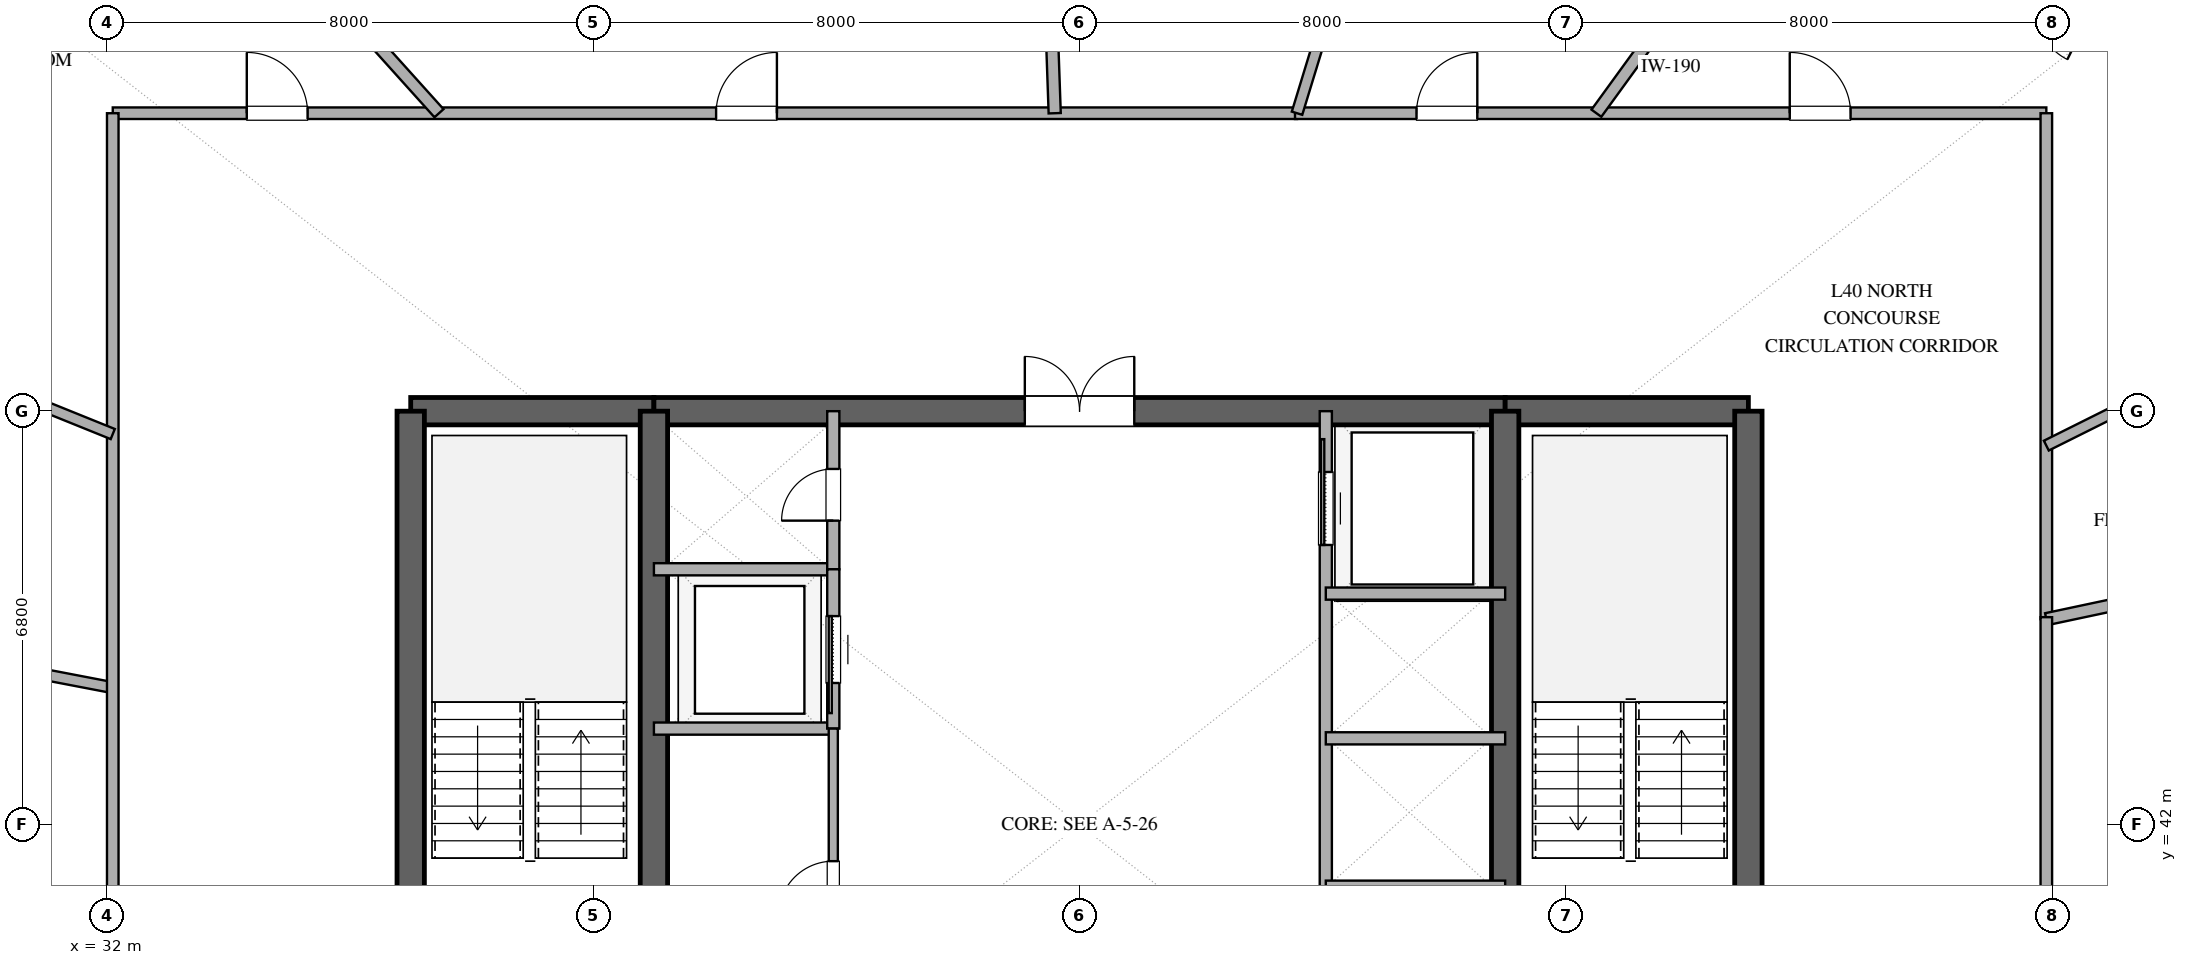
"""IFC4 building model, lengths in metres.
Left out: names, types, materials, properties, quantities, classifications, styles, units other than length and angle.
Written with IfcOpenShell. Run it as: python <this file> out.ifc"""

import sys

from ifc_helpers import new_model, si_unit, direction, frame, frame_2d, origin, place, context, subcontext, project, spatial, rectangle, extrude, element, fill, save


model = new_model("IFC4")
c1 = context("Model", 3, precision=1e-05, world=origin(), true_north=direction((0.0, 1.0)))
c2 = subcontext(c1, "Body", "Model", "MODEL_VIEW")
j1 = project(units=[si_unit("LENGTHUNIT", "METRE"), si_unit("PLANEANGLEUNIT", "RADIAN")], contexts=[c1])
p1 = place(None, origin())
s1 = spatial("IfcSite", under=j1, at=p1, CompositionType="ELEMENT")
p2 = place(p1, origin())
s2 = spatial("IfcBuilding", under=s1, at=p2, CompositionType="ELEMENT")
p3 = place(p2, frame((0.0, 0.0, 161.4)))
s3 = spatial("IfcBuildingStorey", under=s2, at=p3, CompositionType="ELEMENT", Elevation=161.4)
p4 = place(p3, frame((37.0, 48.8, 0.0), z_axis=(0.0, 0.0, 1.0), x_axis=(1.0, 0.0, 0.0)))
e1 = element("IfcWall", 1, at=p4, inside=s3, PredefinedType="SHEAR", context=c2, shape_type="SweptSolid", body=[
    extrude(rectangle(XDim=4.0, YDim=0.45, at=frame_2d((2.0, 0.0))), origin(), (0.0, 0.0, 1.0), 3.38),
])
p5 = place(p3, frame((41.0, 48.8, 0.0), z_axis=(0.0, 0.0, 1.0), x_axis=(1.0, 0.0, 0.0)))
e2 = element("IfcWall", 2, at=p5, inside=s3, PredefinedType="SHEAR", context=c2, shape_type="SweptSolid", body=[
    extrude(rectangle(XDim=14.0, YDim=0.45, at=frame_2d((7.0, 0.0))), origin(), (0.0, 0.0, 1.0), 3.38),
])
p6 = place(p5, frame((6.1, 0.0, 0.0)))
e3 = element("IfcOpeningElement", 3, at=p6, cuts=e2, PredefinedType="OPENING", context=c2, shape_type="SweptSolid", body=[
    extrude(rectangle(XDim=1.8, YDim=2.25, at=frame_2d((0.9, 1.125))), frame((0.0, 0.235, 0.0), z_axis=(0.0, -1.0, 0.0), x_axis=(1.0, 0.0, 0.0)), (0.0, 0.0, 1.0), 0.47),
])
p7 = place(p3, frame((55.0, 48.8, 0.0), z_axis=(0.0, 0.0, 1.0), x_axis=(1.0, 0.0, 0.0)))
e4 = element("IfcWall", 4, at=p7, inside=s3, PredefinedType="SHEAR", context=c2, shape_type="SweptSolid", body=[
    extrude(rectangle(XDim=4.0, YDim=0.45, at=frame_2d((2.0, 0.0))), origin(), (0.0, 0.0, 1.0), 3.38),
])
for number, where, z_axis, x_axis in (
    (5, (37.0, 35.2, 0.0), (0.0, 0.0, 1.0), (0.0, 1.0, 0.0)),
    (6, (59.0, 35.2, 0.0), (0.0, 0.0, 1.0), (0.0, 1.0, 0.0)),
):
    element("IfcWall", number, at=place(p3, frame(where, z_axis=z_axis, x_axis=x_axis)), inside=s3, PredefinedType="SHEAR", context=c2, shape_type="SweptSolid", body=[
        extrude(rectangle(XDim=13.6, YDim=0.45, at=frame_2d((6.8, 0.0))), origin(), (0.0, 0.0, 1.0), 3.38),
    ])
p8 = place(p3, frame((41.0, 35.2, 0.0), z_axis=(0.0, 0.0, 1.0), x_axis=(0.0, 1.0, 0.0)))
e7 = element("IfcWall", 7, at=p8, inside=s3, PredefinedType="SHEAR", context=c2, shape_type="SweptSolid", body=[
    extrude(rectangle(XDim=13.6, YDim=0.45, at=frame_2d((6.8, 0.0))), origin(), (0.0, 0.0, 1.0), 3.38),
])
p9 = place(p8, frame((1.15, 0.0, 0.0)))
e8 = element("IfcOpeningElement", 8, at=p9, cuts=e7, PredefinedType="OPENING", context=c2, shape_type="SweptSolid", body=[
    extrude(rectangle(XDim=1.1, YDim=2.2, at=frame_2d((0.55, 1.1))), frame((0.0, 0.235, 0.0), z_axis=(0.0, -1.0, 0.0), x_axis=(1.0, 0.0, 0.0)), (0.0, 0.0, 1.0), 0.47),
])
p10 = place(p3, frame((55.0, 35.2, 0.0), z_axis=(0.0, 0.0, 1.0), x_axis=(0.0, 1.0, 0.0)))
e9 = element("IfcWall", 9, at=p10, inside=s3, PredefinedType="SHEAR", context=c2, shape_type="SweptSolid", body=[
    extrude(rectangle(XDim=13.6, YDim=0.45, at=frame_2d((6.8, 0.0))), origin(), (0.0, 0.0, 1.0), 3.38),
])
p11 = place(p10, frame((1.15, 0.0, 0.0)))
e10 = element("IfcOpeningElement", 10, at=p11, cuts=e9, PredefinedType="OPENING", context=c2, shape_type="SweptSolid", body=[
    extrude(rectangle(XDim=1.1, YDim=2.2, at=frame_2d((0.55, 1.1))), frame((0.0, 0.235, 0.0), z_axis=(0.0, -1.0, 0.0), x_axis=(1.0, 0.0, 0.0)), (0.0, 0.0, 1.0), 0.47),
])
p12 = place(p3, frame((41.0, 46.2, 0.0), z_axis=(0.0, 0.0, 1.0), x_axis=(1.0, 0.0, 0.0)))
e11 = element("IfcWall", 11, at=p12, inside=s3, PredefinedType="SOLIDWALL", context=c2, shape_type="SweptSolid", body=[
    extrude(rectangle(XDim=2.95, YDim=0.2, at=frame_2d((1.475, 0.0))), origin(), (0.0, 0.0, 1.0), 2.74),
])
p13 = place(p3, frame((43.95, 46.2, 0.0), z_axis=(0.0, 0.0, 1.0), x_axis=(0.0, 1.0, 0.0)))
e12 = element("IfcWall", 12, at=p13, inside=s3, PredefinedType="SOLIDWALL", context=c2, shape_type="SweptSolid", body=[
    extrude(rectangle(XDim=2.6, YDim=0.2, at=frame_2d((1.3, 0.0))), origin(), (0.0, 0.0, 1.0), 2.74),
])
p14 = place(p13, frame((0.8, 0.0, 0.0)))
e13 = element("IfcOpeningElement", 13, at=p14, cuts=e12, PredefinedType="OPENING", context=c2, shape_type="SweptSolid", body=[
    extrude(rectangle(XDim=0.85, YDim=2.15, at=frame_2d((0.425, 1.075))), frame((0.0, 0.11, 0.0), z_axis=(0.0, -1.0, 0.0), x_axis=(1.0, 0.0, 0.0)), (0.0, 0.0, 1.0), 0.22),
])
p15 = place(p3, frame((41.0, 43.58, 0.0), z_axis=(0.0, 0.0, 1.0), x_axis=(1.0, 0.0, 0.0)))
e14 = element("IfcWall", 14, at=p15, inside=s3, PredefinedType="SOLIDWALL", context=c2, shape_type="SweptSolid", body=[
    extrude(rectangle(XDim=2.95, YDim=0.2, at=frame_2d((1.475, 0.0))), origin(), (0.0, 0.0, 1.0), 2.74),
])
p16 = place(p3, frame((43.95, 43.58, 0.0), z_axis=(0.0, 0.0, 1.0), x_axis=(0.0, 1.0, 0.0)))
e15 = element("IfcWall", 15, at=p16, inside=s3, PredefinedType="SOLIDWALL", context=c2, shape_type="SweptSolid", body=[
    extrude(rectangle(XDim=2.62, YDim=0.2, at=frame_2d((1.31, 0.0))), origin(), (0.0, 0.0, 1.0), 2.74),
])
p17 = place(p16, frame((0.75, 0.0, 0.0)))
e16 = element("IfcOpeningElement", 16, at=p17, cuts=e15, PredefinedType="OPENING", context=c2, shape_type="SweptSolid", body=[
    extrude(rectangle(XDim=1.1, YDim=2.2, at=frame_2d((0.55, 1.1))), frame((0.0, 0.11, 0.0), z_axis=(0.0, -1.0, 0.0), x_axis=(1.0, 0.0, 0.0)), (0.0, 0.0, 1.0), 0.22),
])
p18 = place(p3, frame((43.95, 38.4, 0.0), z_axis=(0.0, 0.0, 1.0), x_axis=(0.0, 1.0, 0.0)))
e17 = element("IfcWall", 17, at=p18, inside=s3, PredefinedType="PARTITIONING", context=c2, shape_type="SweptSolid", body=[
    extrude(rectangle(XDim=5.18, YDim=0.15, at=frame_2d((2.59, 0.0))), origin(), (0.0, 0.0, 1.0), 2.74),
])
p19 = place(p18, frame((2.1, 0.0, 0.0)))
e18 = element("IfcOpeningElement", 18, at=p19, cuts=e17, PredefinedType="OPENING", context=c2, shape_type="SweptSolid", body=[
    extrude(rectangle(XDim=0.9, YDim=2.15, at=frame_2d((0.45, 1.075))), frame((0.0, 0.085, 0.0), z_axis=(0.0, -1.0, 0.0), x_axis=(1.0, 0.0, 0.0)), (0.0, 0.0, 1.0), 0.17),
])
p20 = place(p3, frame((52.05, 38.4, 0.0), z_axis=(0.0, 0.0, 1.0), x_axis=(0.0, 1.0, 0.0)))
e19 = element("IfcWall", 19, at=p20, inside=s3, PredefinedType="SOLIDWALL", context=c2, shape_type="SweptSolid", body=[
    extrude(rectangle(XDim=10.4, YDim=0.2, at=frame_2d((5.2, 0.0))), origin(), (0.0, 0.0, 1.0), 2.74),
])
p21 = place(p20, frame((0.7, 0.0, 0.0)))
e20 = element("IfcOpeningElement", 20, at=p21, cuts=e19, PredefinedType="OPENING", context=c2, shape_type="SweptSolid", body=[
    extrude(rectangle(XDim=1.1, YDim=2.2, at=frame_2d((0.55, 1.1))), frame((0.0, 0.11, 0.0), z_axis=(0.0, -1.0, 0.0), x_axis=(1.0, 0.0, 0.0)), (0.0, 0.0, 1.0), 0.22),
])
p22 = place(p20, frame((8.2, 0.0, 0.0)))
e21 = element("IfcOpeningElement", 21, at=p22, cuts=e19, PredefinedType="OPENING", context=c2, shape_type="SweptSolid", body=[
    extrude(rectangle(XDim=1.2, YDim=2.2, at=frame_2d((0.6, 1.1))), frame((0.0, 0.11, 0.0), z_axis=(0.0, -1.0, 0.0), x_axis=(1.0, 0.0, 0.0)), (0.0, 0.0, 1.0), 0.22),
])
for number, where, z_axis, x_axis in (
    (22, (52.05, 40.98, 0.0), (0.0, 0.0, 1.0), (1.0, 0.0, 0.0)),
    (23, (52.05, 43.42, 0.0), (0.0, 0.0, 1.0), (1.0, 0.0, 0.0)),
    (24, (52.05, 45.8, 0.0), (0.0, 0.0, 1.0), (1.0, 0.0, 0.0)),
):
    element("IfcWall", number, at=place(p3, frame(where, z_axis=z_axis, x_axis=x_axis)), inside=s3, PredefinedType="SOLIDWALL", context=c2, shape_type="SweptSolid", body=[
        extrude(rectangle(XDim=2.95, YDim=0.2, at=frame_2d((1.475, 0.0))), origin(), (0.0, 0.0, 1.0), 2.74),
    ])
p23 = place(p3, frame((32.1, 53.7, 0.0), z_axis=(0.0, 0.0, 1.0), x_axis=(1.0, 0.0, 0.0)))
e25 = element("IfcWall", 25, at=p23, inside=s3, PredefinedType="PARTITIONING", context=c2, shape_type="SweptSolid", body=[
    extrude(rectangle(XDim=19.477, YDim=0.19, at=frame_2d((9.738, 0.0))), origin(), (0.0, 0.0, 1.0), 2.74),
])
p24 = place(p23, frame((9.923, 0.0, 0.0)))
e26 = element("IfcOpeningElement", 26, at=p24, cuts=e25, PredefinedType="OPENING", context=c2, shape_type="SweptSolid", body=[
    extrude(rectangle(XDim=1.0, YDim=2.2, at=frame_2d((0.5, 1.1))), frame((0.0, 0.105, 0.0), z_axis=(0.0, -1.0, 0.0), x_axis=(1.0, 0.0, 0.0)), (0.0, 0.0, 1.0), 0.21),
])
p25 = place(p23, frame((2.204, 0.0, 0.0)))
e27 = element("IfcOpeningElement", 27, at=p25, cuts=e25, PredefinedType="OPENING", context=c2, shape_type="SweptSolid", body=[
    extrude(rectangle(XDim=1.0, YDim=2.2, at=frame_2d((0.5, 1.1))), frame((0.0, 0.105, 0.0), z_axis=(0.0, -1.0, 0.0), x_axis=(1.0, 0.0, 0.0)), (0.0, 0.0, 1.0), 0.21),
])
p26 = place(p3, frame((51.543, 53.7, 0.0), z_axis=(0.0, 0.0, 1.0), x_axis=(1.0, 0.0, 0.0)))
e28 = element("IfcWall", 28, at=p26, inside=s3, PredefinedType="PARTITIONING", context=c2, shape_type="SweptSolid", body=[
    extrude(rectangle(XDim=12.356, YDim=0.19, at=frame_2d((6.178, 0.0))), origin(), (0.0, 0.0, 1.0), 2.74),
])
p27 = place(p26, frame((8.137, 0.0, 0.0)))
e29 = element("IfcOpeningElement", 29, at=p27, cuts=e28, PredefinedType="OPENING", context=c2, shape_type="SweptSolid", body=[
    extrude(rectangle(XDim=1.0, YDim=2.2, at=frame_2d((0.5, 1.1))), frame((0.0, 0.105, 0.0), z_axis=(0.0, -1.0, 0.0), x_axis=(1.0, 0.0, 0.0)), (0.0, 0.0, 1.0), 0.21),
])
p28 = place(p26, frame((1.998, 0.0, 0.0)))
e30 = element("IfcOpeningElement", 30, at=p28, cuts=e28, PredefinedType="OPENING", context=c2, shape_type="SweptSolid", body=[
    extrude(rectangle(XDim=1.0, YDim=2.2, at=frame_2d((0.5, 1.1))), frame((0.0, 0.105, 0.0), z_axis=(0.0, -1.0, 0.0), x_axis=(1.0, 0.0, 0.0)), (0.0, 0.0, 1.0), 0.21),
])
p29 = place(p3, frame((37.465, 53.7, 0.0), z_axis=(0.0, 0.0, 1.0), x_axis=(-0.669128292476, 0.7431469089, 0.0)))
e31 = element("IfcWall", 31, at=p29, inside=s3, PredefinedType="PARTITIONING", context=c2, shape_type="SweptSolid", body=[
    extrude(rectangle(XDim=7.339, YDim=0.2, at=frame_2d((3.669, 0.0))), origin(), (0.0, 0.0, 1.0), 2.74),
])
p30 = place(p3, frame((63.9, 53.7, 0.0), z_axis=(0.0, 0.0, 1.0), x_axis=(0.0, -1.0, 0.0)))
e32 = element("IfcWall", 32, at=p30, inside=s3, PredefinedType="PARTITIONING", context=c2, shape_type="SweptSolid", body=[
    extrude(rectangle(XDim=8.32, YDim=0.19, at=frame_2d((4.16, 0.0))), origin(), (0.0, 0.0, 1.0), 2.74),
])
p31 = place(p3, frame((32.1, 44.253, 0.0), z_axis=(0.0, 0.0, 1.0), x_axis=(-0.982102846986, 0.188345421878, 0.0)))
e33 = element("IfcWall", 33, at=p31, inside=s3, PredefinedType="PLUMBINGWALL", context=c2, shape_type="SweptSolid", body=[
    extrude(rectangle(XDim=5.448, YDim=0.18, at=frame_2d((2.724, 0.0))), origin(), (0.0, 0.0, 1.0), 2.74),
])
p32 = place(p31, frame((2.299, 0.0, 0.0)))
e34 = element("IfcOpeningElement", 34, at=p32, cuts=e33, PredefinedType="OPENING", context=c2, shape_type="SweptSolid", body=[
    extrude(rectangle(XDim=0.85, YDim=2.1, at=frame_2d((0.425, 1.05))), frame((0.0, 0.1, 0.0), z_axis=(0.0, -1.0, 0.0), x_axis=(1.0, 0.0, 0.0)), (0.0, 0.0, 1.0), 0.2),
])
p33 = place(p3, frame((32.1, 40.856, 0.0), z_axis=(0.0, 0.0, 1.0), x_axis=(0.0, 1.0, 0.0)))
e35 = element("IfcWall", 35, at=p33, inside=s3, PredefinedType="PARTITIONING", context=c2, shape_type="SweptSolid", body=[
    extrude(rectangle(XDim=12.844, YDim=0.19, at=frame_2d((6.422, 0.0))), origin(), (0.0, 0.0, 1.0), 2.74),
])
p34 = place(p3, frame((63.9, 45.38, 0.0), z_axis=(0.0, 0.0, 1.0), x_axis=(0.978145779981, 0.207920256603, 0.0)))
e36 = element("IfcWall", 36, at=p34, inside=s3, PredefinedType="PARTITIONING", context=c2, shape_type="SweptSolid", body=[
    extrude(rectangle(XDim=6.789, YDim=0.2, at=frame_2d((3.395, 0.0))), origin(), (0.0, 0.0, 1.0), 2.74),
])
p35 = place(p3, frame((63.9, 45.412, 0.0), z_axis=(0.0, 0.0, 1.0), x_axis=(0.0, -1.0, 0.0)))
e37 = element("IfcWall", 37, at=p35, inside=s3, PredefinedType="PARTITIONING", context=c2, shape_type="SweptSolid", body=[
    extrude(rectangle(XDim=4.987, YDim=0.19, at=frame_2d((2.494, 0.0))), origin(), (0.0, 0.0, 1.0), 2.74),
])
p36 = place(p3, frame((61.274, 60.27, 0.0), z_axis=(0.0, 0.0, 1.0), x_axis=(-0.587785528328, -0.809016793823, 0.0)))
e38 = element("IfcWall", 38, at=p36, inside=s3, PredefinedType="PARTITIONING", context=c2, shape_type="SweptSolid", body=[
    extrude(rectangle(XDim=8.121, YDim=0.2, at=frame_2d((4.061, 0.0))), origin(), (0.0, 0.0, 1.0), 2.74),
])
p37 = place(p3, frame((47.378, 59.821, 0.0), z_axis=(0.0, 0.0, 1.0), x_axis=(0.034876866147, -0.999391617039, 0.0)))
e39 = element("IfcWall", 39, at=p37, inside=s3, PredefinedType="PARTITIONING", context=c2, shape_type="SweptSolid", body=[
    extrude(rectangle(XDim=6.125, YDim=0.2, at=frame_2d((3.062, 0.0))), origin(), (0.0, 0.0, 1.0), 2.74),
])
p38 = place(p3, frame((52.797, 57.69, 0.0), z_axis=(0.0, 0.0, 1.0), x_axis=(-0.29241622154, -0.956291144673, 0.0)))
e40 = element("IfcWall", 40, at=p38, inside=s3, PredefinedType="PLUMBINGWALL", context=c2, shape_type="SweptSolid", body=[
    extrude(rectangle(XDim=4.173, YDim=0.18, at=frame_2d((2.086, 0.0))), origin(), (0.0, 0.0, 1.0), 2.74),
])
p39 = place(p3, frame((67.152, 49.856, 0.0), z_axis=(0.0, 0.0, 1.0), x_axis=(-0.894843352961, -0.446380301605, 0.0)))
e41 = element("IfcWall", 41, at=p39, inside=s3, PredefinedType="PLUMBINGWALL", context=c2, shape_type="SweptSolid", body=[
    extrude(rectangle(XDim=3.634, YDim=0.18, at=frame_2d((1.817, 0.0))), origin(), (0.0, 0.0, 1.0), 2.74),
])
p40 = place(p39, frame((1.392, 0.0, 0.0)))
e42 = element("IfcOpeningElement", 42, at=p40, cuts=e41, PredefinedType="OPENING", context=c2, shape_type="SweptSolid", body=[
    extrude(rectangle(XDim=0.85, YDim=2.1, at=frame_2d((0.425, 1.05))), frame((0.0, 0.1, 0.0), z_axis=(0.0, -1.0, 0.0), x_axis=(1.0, 0.0, 0.0)), (0.0, 0.0, 1.0), 0.2),
])
p41 = place(p3, frame((28.773, 49.768, 0.0), z_axis=(0.0, 0.0, 1.0), x_axis=(0.927195040954, -0.374578904945, 0.0)))
e43 = element("IfcWall", 43, at=p41, inside=s3, PredefinedType="PLUMBINGWALL", context=c2, shape_type="SweptSolid", body=[
    extrude(rectangle(XDim=3.589, YDim=0.18, at=frame_2d((1.794, 0.0))), origin(), (0.0, 0.0, 1.0), 2.74),
])
p42 = place(p6, origin())
e44 = element("IfcDoor", 44, at=p42, inside=s3, OperationType="DOUBLE_DOOR_SINGLE_SWING", PredefinedType="DOOR", context=c2, shape_type="SweptSolid", body=[
    extrude(rectangle(XDim=1.8, YDim=2.25, at=frame_2d((0.9, 1.125))), frame((0.0, 0.025, 0.0), z_axis=(0.0, -1.0, 0.0), x_axis=(1.0, 0.0, 0.0)), (0.0, 0.0, 1.0), 0.05),
])
fill(e3, e44)
p43 = place(p14, origin())
e45 = element("IfcDoor", 45, at=p43, inside=s3, OperationType="SINGLE_SWING_LEFT", PredefinedType="DOOR", context=c2, shape_type="SweptSolid", body=[
    extrude(rectangle(XDim=0.85, YDim=2.15, at=frame_2d((0.425, 1.075))), frame((0.0, 0.025, 0.0), z_axis=(0.0, -1.0, 0.0), x_axis=(1.0, 0.0, 0.0)), (0.0, 0.0, 1.0), 0.05),
])
fill(e13, e45)
p44 = place(p17, origin())
e46 = element("IfcDoor", 46, at=p44, inside=s3, OperationType="SLIDING_TO_LEFT", PredefinedType="DOOR", context=c2, shape_type="SweptSolid", body=[
    extrude(rectangle(XDim=1.1, YDim=2.2, at=frame_2d((0.55, 1.1))), frame((0.0, 0.025, 0.0), z_axis=(0.0, -1.0, 0.0), x_axis=(1.0, 0.0, 0.0)), (0.0, 0.0, 1.0), 0.05),
])
fill(e16, e46)
p45 = place(p19, origin())
e47 = element("IfcDoor", 47, at=p45, inside=s3, OperationType="SINGLE_SWING_LEFT", PredefinedType="DOOR", context=c2, shape_type="SweptSolid", body=[
    extrude(rectangle(XDim=0.9, YDim=2.15, at=frame_2d((0.45, 1.075))), frame((0.0, 0.025, 0.0), z_axis=(0.0, -1.0, 0.0), x_axis=(1.0, 0.0, 0.0)), (0.0, 0.0, 1.0), 0.05),
])
fill(e18, e47)
p46 = place(p22, origin())
e48 = element("IfcDoor", 48, at=p46, inside=s3, OperationType="SLIDING_TO_RIGHT", PredefinedType="DOOR", context=c2, shape_type="SweptSolid", body=[
    extrude(rectangle(XDim=1.2, YDim=2.2, at=frame_2d((0.6, 1.1))), frame((0.0, 0.025, 0.0), z_axis=(0.0, -1.0, 0.0), x_axis=(1.0, 0.0, 0.0)), (0.0, 0.0, 1.0), 0.05),
])
fill(e21, e48)
p47 = place(p24, origin())
e49 = element("IfcDoor", 49, at=p47, inside=s3, OperationType="SINGLE_SWING_RIGHT", PredefinedType="DOOR", context=c2, shape_type="SweptSolid", body=[
    extrude(rectangle(XDim=1.0, YDim=2.2, at=frame_2d((0.5, 1.1))), frame((0.0, 0.025, 0.0), z_axis=(0.0, -1.0, 0.0), x_axis=(1.0, 0.0, 0.0)), (0.0, 0.0, 1.0), 0.05),
])
fill(e26, e49)
p48 = place(p25, origin())
e50 = element("IfcDoor", 50, at=p48, inside=s3, OperationType="SINGLE_SWING_LEFT", PredefinedType="DOOR", context=c2, shape_type="SweptSolid", body=[
    extrude(rectangle(XDim=1.0, YDim=2.2, at=frame_2d((0.5, 1.1))), frame((0.0, 0.025, 0.0), z_axis=(0.0, -1.0, 0.0), x_axis=(1.0, 0.0, 0.0)), (0.0, 0.0, 1.0), 0.05),
])
fill(e27, e50)
p49 = place(p27, origin())
e51 = element("IfcDoor", 51, at=p49, inside=s3, OperationType="SINGLE_SWING_LEFT", PredefinedType="DOOR", context=c2, shape_type="SweptSolid", body=[
    extrude(rectangle(XDim=1.0, YDim=2.2, at=frame_2d((0.5, 1.1))), frame((0.0, 0.025, 0.0), z_axis=(0.0, -1.0, 0.0), x_axis=(1.0, 0.0, 0.0)), (0.0, 0.0, 1.0), 0.05),
])
fill(e29, e51)
p50 = place(p28, origin())
e52 = element("IfcDoor", 52, at=p50, inside=s3, OperationType="SINGLE_SWING_RIGHT", PredefinedType="DOOR", context=c2, shape_type="SweptSolid", body=[
    extrude(rectangle(XDim=1.0, YDim=2.2, at=frame_2d((0.5, 1.1))), frame((0.0, 0.025, 0.0), z_axis=(0.0, -1.0, 0.0), x_axis=(1.0, 0.0, 0.0)), (0.0, 0.0, 1.0), 0.05),
])
fill(e30, e52)
save(model, sys.argv[1])
